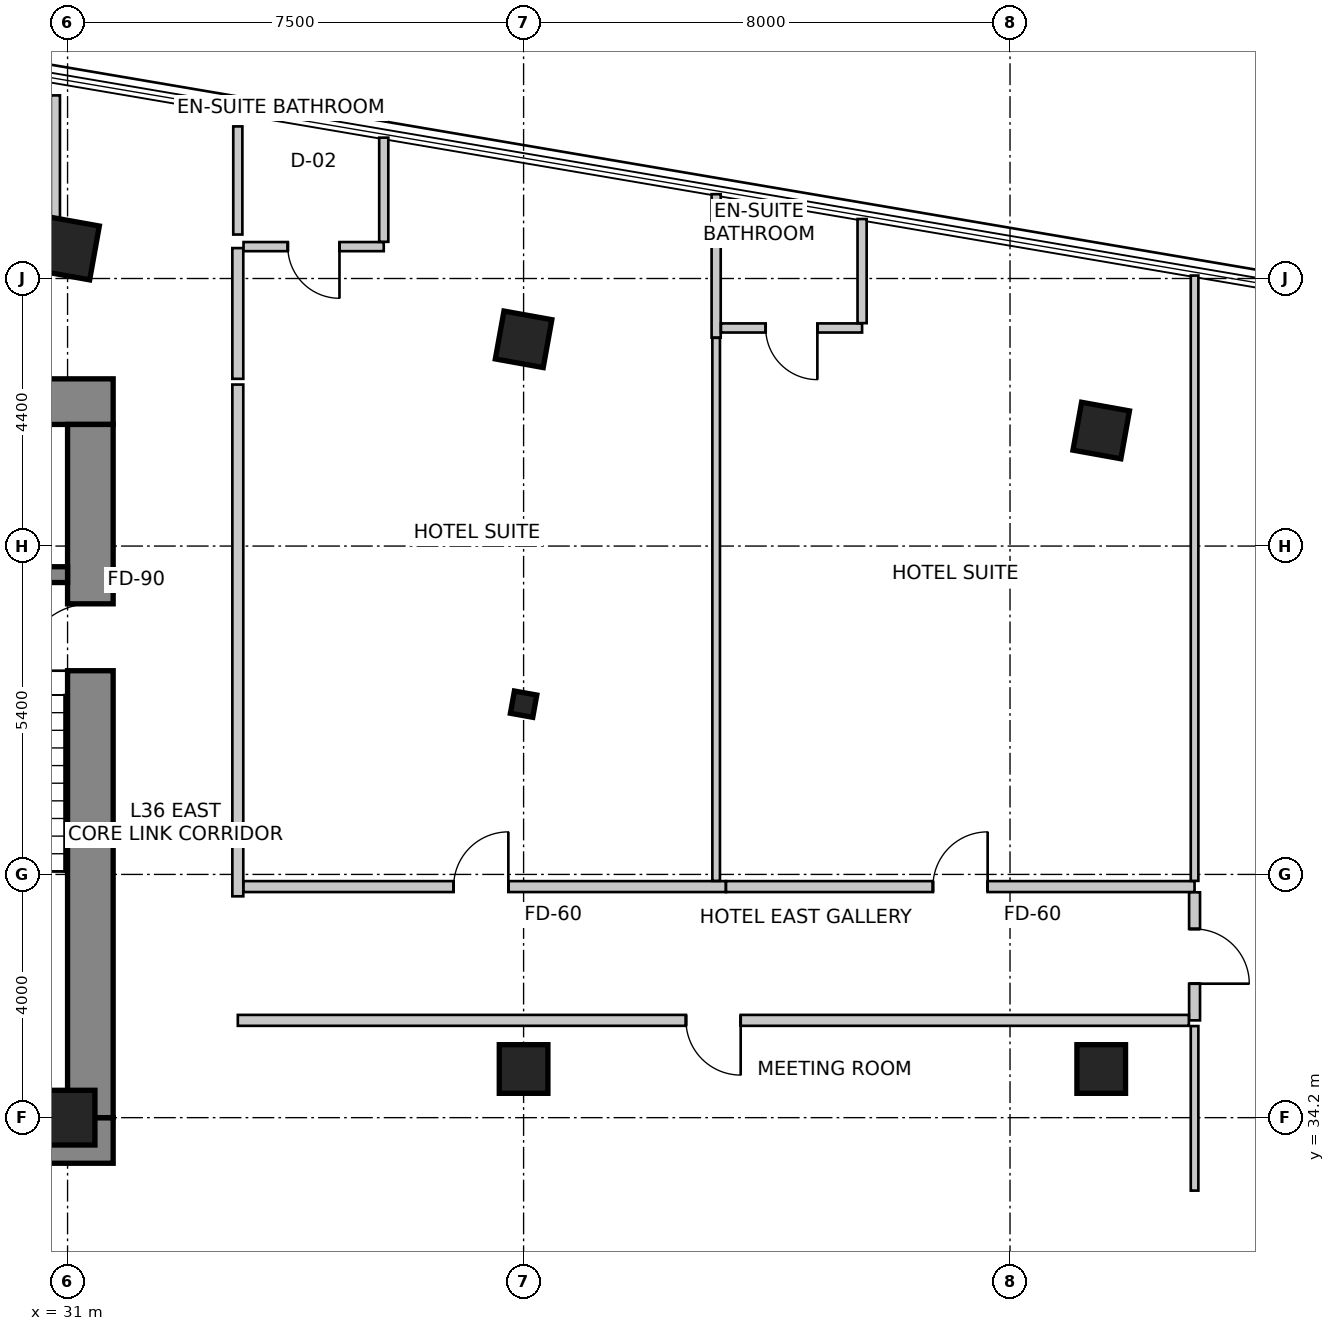
"""IFC4 building model, lengths in metres.
Left out: names, types, materials, properties, quantities, classifications, styles, units other than length and angle.
Written with IfcOpenShell. Run it as: python <this file> out.ifc"""

import sys

from ifc_helpers import new_model, si_unit, direction, frame, frame_2d, origin, origin_2d, place, context, subcontext, project, spatial, rectangle, i_section, extrude, source, transform, mapped, element, fill, save


model = new_model("IFC4")
c1 = context("Model", 3, precision=1e-05, world=origin(), true_north=direction((0.0, 1.0)))
c2 = subcontext(c1, "Body", "Model", "MODEL_VIEW")
j1 = project(units=[si_unit("LENGTHUNIT", "METRE"), si_unit("PLANEANGLEUNIT", "RADIAN")], contexts=[c1])
p1 = place(None, origin())
s1 = spatial("IfcSite", under=j1, at=p1, CompositionType="ELEMENT")
p2 = place(p1, origin())
s2 = spatial("IfcBuilding", under=s1, at=p2, CompositionType="ELEMENT")
p3 = place(p2, frame((0.0, 0.0, 146.6)))
s3 = spatial("IfcBuildingStorey", under=s2, at=p3, CompositionType="ELEMENT", Elevation=146.6)
p4 = place(p3, frame((15.85, 45.975, 0.0), z_axis=(0.0, 0.0, 1.0), x_axis=(1.0, 0.0, 0.0)))
e1 = element("IfcWall", 1, at=p4, inside=s3, PredefinedType="SHEAR", context=c2, shape_type="SweptSolid", body=[
    extrude(rectangle(XDim=15.9, YDim=0.75, at=frame_2d((7.95, 0.0))), origin(), (0.0, 0.0, 1.0), 3.6),
])
p5 = place(p3, frame((15.85, 33.825, 0.0), z_axis=(0.0, 0.0, 1.0), x_axis=(1.0, 0.0, 0.0)))
e2 = element("IfcWall", 2, at=p5, inside=s3, PredefinedType="SHEAR", context=c2, shape_type="SweptSolid", body=[
    extrude(rectangle(XDim=15.9, YDim=0.75, at=frame_2d((7.95, 0.0))), origin(), (0.0, 0.0, 1.0), 3.6),
])
m1 = source(origin(), c2, "Body", "SweptSolid", [
    extrude(rectangle(XDim=1.3, YDim=2.15, at=frame_2d((0.65, 1.075))), frame((0.0, 0.385, 0.0), z_axis=(0.0, -1.0, 0.0), x_axis=(1.0, 0.0, 0.0)), (0.0, 0.0, 1.0), 0.77),
])
p6 = place(p5, frame((10.08, 0.0, 0.0)))
e3 = element("IfcOpeningElement", 3, at=p6, cuts=e2, PredefinedType="OPENING", context=c2, shape_type="MappedRepresentation", body=[
    mapped(m1, transform((0.0, 0.0, 0.0), scale=1.0)),
])
p7 = place(p3, frame((31.375, 34.2, 0.0), z_axis=(0.0, 0.0, 1.0), x_axis=(0.0, 1.0, 0.0)))
e4 = element("IfcWall", 4, at=p7, inside=s3, PredefinedType="SHEAR", context=c2, shape_type="SweptSolid", body=[
    extrude(rectangle(XDim=11.4, YDim=0.75, at=frame_2d((5.7, 0.0))), origin(), (0.0, 0.0, 1.0), 3.6),
])
m2 = source(origin(), c2, "Body", "SweptSolid", [
    extrude(rectangle(XDim=1.1, YDim=2.15, at=frame_2d((0.55, 1.075))), frame((0.0, 0.385, 0.0), z_axis=(0.0, -1.0, 0.0), x_axis=(1.0, 0.0, 0.0)), (0.0, 0.0, 1.0), 0.77),
])
p8 = place(p7, frame((7.35, 0.0, 0.0)))
e5 = element("IfcOpeningElement", 5, at=p8, cuts=e4, PredefinedType="OPENING", context=c2, shape_type="MappedRepresentation", body=[
    mapped(m2, transform((0.0, 0.0, 0.0), scale=1.0)),
])
p9 = place(p3, frame((27.5, 43.13, 0.0), z_axis=(0.0, 0.0, 1.0), x_axis=(1.0, 0.0, 0.0)))
e6 = element("IfcWall", 6, at=p9, inside=s3, PredefinedType="SHEAR", context=c2, shape_type="SweptSolid", body=[
    extrude(rectangle(XDim=3.5, YDim=0.26, at=frame_2d((1.75, 0.0))), origin(), (0.0, 0.0, 1.0), 3.6),
])
m3 = source(origin(), c2, "Body", "SweptSolid", [
    extrude(rectangle(XDim=0.9, YDim=0.9, at=origin_2d()), origin(), (0.0, 0.0, 1.0), 3.6),
])
p10 = place(p3, frame((31.0, 48.5, 0.0), z_axis=(0.0, 0.0, 1.0), x_axis=(0.984195607969, -0.17708474032, 0.0)))
e7 = element("IfcColumn", 7, at=p10, inside=s3, PredefinedType="COLUMN", context=c2, shape_type="MappedRepresentation", body=[
    mapped(m3, transform((0.0, 0.0, 0.0), scale=1.0)),
])
m4 = source(origin(), c2, "Body", "SweptSolid", [
    extrude(rectangle(XDim=0.8, YDim=0.8, at=origin_2d()), origin(), (0.0, 0.0, 1.0), 3.6),
])
for number, where, z_axis, x_axis in (
    (8, (38.5, 47.0, 0.0), (0.0, 0.0, 1.0), (0.984, -0.177, 0.0)),
    (9, (48.0, 45.5, 0.0), (0.0, 0.0, 1.0), (0.984, -0.177, 0.0)),
):
    element("IfcColumn", number, at=place(p3, frame(where, z_axis=z_axis, x_axis=x_axis)), inside=s3, PredefinedType="COLUMN", context=c2, shape_type="MappedRepresentation", body=[
        mapped(m4, transform((0.0, 0.0, 0.0), scale=1.0)),
    ])
p11 = place(p3, frame((31.0, 34.2, 0.0), z_axis=(0.0, 0.0, 1.0), x_axis=(1.0, 0.0, 0.0)))
e10 = element("IfcColumn", 10, at=p11, inside=s3, PredefinedType="COLUMN", context=c2, shape_type="MappedRepresentation", body=[
    mapped(m3, transform((0.0, 0.0, 0.0), scale=1.0)),
])
for number, where, z_axis, x_axis in (
    (11, (38.5, 35.0, 0.0), (0.0, 0.0, 1.0), (1.0, 0.0, 0.0)),
    (12, (48.0, 35.0, 0.0), (0.0, 0.0, 1.0), (1.0, 0.0, 0.0)),
):
    element("IfcColumn", number, at=place(p3, frame(where, z_axis=z_axis, x_axis=x_axis)), inside=s3, PredefinedType="COLUMN", context=c2, shape_type="MappedRepresentation", body=[
        mapped(m4, transform((0.0, 0.0, 0.0), scale=1.0)),
    ])
m5 = source(origin(), c2, "Body", "SweptSolid", [
    extrude(i_section(OverallWidth=0.374, OverallDepth=0.372, WebThickness=0.016, FlangeThickness=0.026, FilletRadius=0.015, at=origin_2d()), origin(), (0.0, 0.0, 1.0), 3.6),
])
p12 = place(p3, frame((38.5, 41.0, 0.0), z_axis=(0.0, 0.0, 1.0), x_axis=(0.984195607969, -0.17708474032, 0.0)))
e13 = element("IfcColumn", 13, at=p12, inside=s3, PredefinedType="COLUMN", context=c2, shape_type="MappedRepresentation", body=[
    mapped(m5, transform((0.0, 0.0, 0.0), scale=1.0)),
])
p13 = place(p3, frame((23.962, 48.5, 0.0), z_axis=(0.0, 0.0, 1.0), x_axis=(1.0, 0.0, 0.0)))
e14 = element("IfcWall", 14, at=p13, inside=s3, PredefinedType="PARTITIONING", context=c2, shape_type="SweptSolid", body=[
    extrude(rectangle(XDim=6.998, YDim=0.18, at=frame_2d((3.499, 0.0))), origin(), (0.0, 0.0, 1.0), 2.492),
])
m6 = source(origin(), c2, "Body", "SweptSolid", [
    extrude(rectangle(XDim=0.85, YDim=2.15, at=frame_2d((0.425, 1.075))), frame((0.0, 0.1, 0.0), z_axis=(0.0, -1.0, 0.0), x_axis=(1.0, 0.0, 0.0)), (0.0, 0.0, 1.0), 0.2),
])
p14 = place(p13, frame((3.074, 0.0, 0.0)))
e15 = element("IfcOpeningElement", 15, at=p14, cuts=e14, PredefinedType="OPENING", context=c2, shape_type="MappedRepresentation", body=[
    mapped(m6, transform((0.0, 0.0, 0.0), scale=1.0)),
])
p15 = place(p3, frame((33.8, 48.5, 0.0), z_axis=(0.0, 0.0, 1.0), x_axis=(0.0, -1.0, 0.0)))
e16 = element("IfcWall", 16, at=p15, inside=s3, PredefinedType="PARTITIONING", context=c2, shape_type="SweptSolid", body=[
    extrude(rectangle(XDim=2.15, YDim=0.18, at=frame_2d((1.075, 0.0))), origin(), (0.0, 0.0, 1.0), 2.492),
])
p16 = place(p3, frame((33.8, 46.256, 0.0), z_axis=(0.0, 0.0, 1.0), x_axis=(0.0, -1.0, 0.0)))
e17 = element("IfcWall", 17, at=p16, inside=s3, PredefinedType="PARTITIONING", context=c2, shape_type="SweptSolid", body=[
    extrude(rectangle(XDim=8.416, YDim=0.18, at=frame_2d((4.208, 0.0))), origin(), (0.0, 0.0, 1.0), 2.788),
])
p17 = place(p3, frame((33.894, 38.0, 0.0), z_axis=(0.0, 0.0, 1.0), x_axis=(1.0, 0.0, 0.0)))
e18 = element("IfcWall", 18, at=p17, inside=s3, PredefinedType="PARTITIONING", context=c2, shape_type="SweptSolid", body=[
    extrude(rectangle(XDim=7.933, YDim=0.18, at=frame_2d((3.966, 0.0))), origin(), (0.0, 0.0, 1.0), 2.788),
])
m7 = source(origin(), c2, "Body", "SweptSolid", [
    extrude(rectangle(XDim=0.9, YDim=2.15, at=frame_2d((0.45, 1.075))), frame((0.0, 0.1, 0.0), z_axis=(0.0, -1.0, 0.0), x_axis=(1.0, 0.0, 0.0)), (0.0, 0.0, 1.0), 0.2),
])
p18 = place(p17, frame((3.455, 0.0, 0.0)))
e19 = element("IfcOpeningElement", 19, at=p18, cuts=e18, PredefinedType="OPENING", context=c2, shape_type="MappedRepresentation", body=[
    mapped(m7, transform((0.0, 0.0, 0.0), scale=1.0)),
])
p19 = place(p3, frame((41.829, 38.0, 0.0), z_axis=(0.0, 0.0, 1.0), x_axis=(1.0, 0.0, 0.0)))
e20 = element("IfcWall", 20, at=p19, inside=s3, PredefinedType="PARTITIONING", context=c2, shape_type="SweptSolid", body=[
    extrude(rectangle(XDim=7.706, YDim=0.18, at=frame_2d((3.853, 0.0))), origin(), (0.0, 0.0, 1.0), 2.788),
])
p20 = place(p19, frame((3.403, 0.0, 0.0)))
e21 = element("IfcOpeningElement", 21, at=p20, cuts=e20, PredefinedType="OPENING", context=c2, shape_type="MappedRepresentation", body=[
    mapped(m7, transform((0.0, 0.0, 0.0), scale=1.0)),
])
p21 = place(p3, frame((49.535, 37.906, 0.0), z_axis=(0.0, 0.0, 1.0), x_axis=(0.0, -1.0, 0.0)))
e22 = element("IfcWall", 22, at=p21, inside=s3, PredefinedType="PARTITIONING", context=c2, shape_type="SweptSolid", body=[
    extrude(rectangle(XDim=2.106, YDim=0.18, at=frame_2d((1.053, 0.0))), origin(), (0.0, 0.0, 1.0), 3.35),
])
p22 = place(p21, frame((0.603, 0.0, 0.0)))
e23 = element("IfcOpeningElement", 23, at=p22, cuts=e22, PredefinedType="OPENING", context=c2, shape_type="MappedRepresentation", body=[
    mapped(m7, transform((0.0, 0.0, 0.0), scale=1.0)),
])
p23 = place(p3, frame((49.441, 35.8, 0.0), z_axis=(0.0, 0.0, 1.0), x_axis=(-1.0, 0.0, 0.0)))
e24 = element("IfcWall", 24, at=p23, inside=s3, PredefinedType="PARTITIONING", context=c2, shape_type="SweptSolid", body=[
    extrude(rectangle(XDim=15.641, YDim=0.18, at=frame_2d((7.82, 0.0))), origin(), (0.0, 0.0, 1.0), 2.788),
])
p24 = place(p23, frame((7.371, 0.0, 0.0)))
e25 = element("IfcOpeningElement", 25, at=p24, cuts=e24, PredefinedType="OPENING", context=c2, shape_type="MappedRepresentation", body=[
    mapped(m7, transform((0.0, 0.0, 0.0), scale=1.0)),
])
p25 = place(p3, frame((36.2, 48.524, 0.0), z_axis=(0.0, 0.0, 1.0), x_axis=(-1.0, 0.0, 0.0)))
e26 = element("IfcWall", 26, at=p25, inside=s3, PredefinedType="PARTITIONING", context=c2, shape_type="SweptSolid", body=[
    extrude(rectangle(XDim=2.306, YDim=0.15, at=frame_2d((1.153, 0.0))), origin(), (0.0, 0.0, 1.0), 3.35),
])
m8 = source(origin(), c2, "Body", "SweptSolid", [
    extrude(rectangle(XDim=0.85, YDim=2.15, at=frame_2d((0.425, 1.075))), frame((0.0, 0.085, 0.0), z_axis=(0.0, -1.0, 0.0), x_axis=(1.0, 0.0, 0.0)), (0.0, 0.0, 1.0), 0.17),
])
p26 = place(p25, frame((0.728, 0.0, 0.0)))
e27 = element("IfcOpeningElement", 27, at=p26, cuts=e26, PredefinedType="OPENING", context=c2, shape_type="MappedRepresentation", body=[
    mapped(m8, transform((0.0, 0.0, 0.0), scale=1.0)),
])
p27 = place(p3, frame((36.2, 50.316, 0.0), z_axis=(0.0, 0.0, 1.0), x_axis=(0.0, -1.0, 0.0)))
e28 = element("IfcWall", 28, at=p27, inside=s3, PredefinedType="PARTITIONING", context=c2, shape_type="SweptSolid", body=[
    extrude(rectangle(XDim=1.713, YDim=0.15, at=frame_2d((0.856, 0.0))), origin(), (0.0, 0.0, 1.0), 3.35),
])
p28 = place(p3, frame((41.667, 49.387, 0.0), z_axis=(0.0, 0.0, 1.0), x_axis=(0.0, -1.0, 0.0)))
e29 = element("IfcWall", 29, at=p28, inside=s3, PredefinedType="PARTITIONING", context=c2, shape_type="SweptSolid", body=[
    extrude(rectangle(XDim=2.36, YDim=0.15, at=frame_2d((1.18, 0.0))), origin(), (0.0, 0.0, 1.0), 3.35),
])
p29 = place(p3, frame((41.667, 47.025, 0.0), z_axis=(0.0, 0.0, 1.0), x_axis=(0.0, -1.0, 0.0)))
e30 = element("IfcWall", 30, at=p29, inside=s3, PredefinedType="PARTITIONING", context=c2, shape_type="SweptSolid", body=[
    extrude(rectangle(XDim=8.931, YDim=0.125, at=frame_2d((4.465, 0.0))), origin(), (0.0, 0.0, 1.0), 2.492),
])
p30 = place(p3, frame((44.067, 47.187, 0.0), z_axis=(0.0, 0.0, 1.0), x_axis=(-1.0, 0.0, 0.0)))
e31 = element("IfcWall", 31, at=p30, inside=s3, PredefinedType="PARTITIONING", context=c2, shape_type="SweptSolid", body=[
    extrude(rectangle(XDim=2.321, YDim=0.15, at=frame_2d((1.16, 0.0))), origin(), (0.0, 0.0, 1.0), 3.35),
])
p31 = place(p30, frame((0.736, 0.0, 0.0)))
e32 = element("IfcOpeningElement", 32, at=p31, cuts=e31, PredefinedType="OPENING", context=c2, shape_type="MappedRepresentation", body=[
    mapped(m8, transform((0.0, 0.0, 0.0), scale=1.0)),
])
p32 = place(p3, frame((44.067, 48.979, 0.0), z_axis=(0.0, 0.0, 1.0), x_axis=(0.0, -1.0, 0.0)))
e33 = element("IfcWall", 33, at=p32, inside=s3, PredefinedType="PARTITIONING", context=c2, shape_type="SweptSolid", body=[
    extrude(rectangle(XDim=1.713, YDim=0.15, at=frame_2d((0.856, 0.0))), origin(), (0.0, 0.0, 1.0), 3.35),
])
p33 = place(p3, frame((49.535, 48.049, 0.0), z_axis=(0.0, 0.0, 1.0), x_axis=(0.0, -1.0, 0.0)))
e34 = element("IfcWall", 34, at=p33, inside=s3, PredefinedType="PARTITIONING", context=c2, shape_type="SweptSolid", body=[
    extrude(rectangle(XDim=9.955, YDim=0.125, at=frame_2d((4.977, 0.0))), origin(), (0.0, 0.0, 1.0), 3.35),
])
p34 = place(p3, frame((49.535, 33.0, 0.0), z_axis=(0.0, 0.0, 1.0), x_axis=(0.0, 1.0, 0.0)))
e35 = element("IfcWall", 35, at=p34, inside=s3, PredefinedType="PARTITIONING", context=c2, shape_type="SweptSolid", body=[
    extrude(rectangle(XDim=2.706, YDim=0.125, at=frame_2d((1.353, 0.0))), origin(), (0.0, 0.0, 1.0), 3.35),
])
p35 = place(p3, frame((30.8, 51.011, 0.0), z_axis=(0.0, 0.0, 1.0), x_axis=(0.0, -1.0, 0.0)))
e36 = element("IfcWall", 36, at=p35, inside=s3, PredefinedType="PARTITIONING", context=c2, shape_type="SweptSolid", body=[
    extrude(rectangle(XDim=2.292, YDim=0.15, at=frame_2d((1.146, 0.0))), origin(), (0.0, 0.0, 1.0), 3.35),
])
p36 = place(p3, frame((33.8, 48.723, 0.0), z_axis=(0.0, 0.0, 1.0), x_axis=(0.0, 1.0, 0.0)))
e37 = element("IfcWall", 37, at=p36, inside=s3, PredefinedType="PARTITIONING", context=c2, shape_type="SweptSolid", body=[
    extrude(rectangle(XDim=1.778, YDim=0.15, at=frame_2d((0.889, 0.0))), origin(), (0.0, 0.0, 1.0), 3.35),
])
m9 = source(origin(), c2, "Body", "SweptSolid", [
    extrude(rectangle(XDim=1.1, YDim=2.15, at=frame_2d((0.55, 1.075))), frame((0.0, 0.025, 0.0), z_axis=(0.0, -1.0, 0.0), x_axis=(1.0, 0.0, 0.0)), (0.0, 0.0, 1.0), 0.05),
])
p37 = place(p8, origin())
e38 = element("IfcDoor", 38, at=p37, inside=s3, OperationType="SINGLE_SWING_LEFT", PredefinedType="DOOR", context=c2, shape_type="MappedRepresentation", body=[
    mapped(m9, transform((0.0, 0.0, 0.0), scale=1.0)),
])
fill(e5, e38)
m10 = source(origin(), c2, "Body", "SweptSolid", [
    extrude(rectangle(XDim=0.85, YDim=2.15, at=frame_2d((0.425, 1.075))), frame((0.0, 0.025, 0.0), z_axis=(0.0, -1.0, 0.0), x_axis=(1.0, 0.0, 0.0)), (0.0, 0.0, 1.0), 0.05),
])
p38 = place(p26, origin())
e39 = element("IfcDoor", 39, at=p38, inside=s3, OperationType="SINGLE_SWING_LEFT", PredefinedType="DOOR", context=c2, shape_type="MappedRepresentation", body=[
    mapped(m10, transform((0.0, 0.0, 0.0), scale=1.0)),
])
fill(e27, e39)
m11 = source(origin(), c2, "Body", "SweptSolid", [
    extrude(rectangle(XDim=0.9, YDim=2.15, at=frame_2d((0.45, 1.075))), frame((0.0, 0.025, 0.0), z_axis=(0.0, -1.0, 0.0), x_axis=(1.0, 0.0, 0.0)), (0.0, 0.0, 1.0), 0.05),
])
p39 = place(p18, origin())
e40 = element("IfcDoor", 40, at=p39, inside=s3, OperationType="SINGLE_SWING_RIGHT", PredefinedType="DOOR", context=c2, shape_type="MappedRepresentation", body=[
    mapped(m11, transform((0.0, 0.0, 0.0), scale=1.0)),
])
fill(e19, e40)
p40 = place(p31, origin())
e41 = element("IfcDoor", 41, at=p40, inside=s3, OperationType="SINGLE_SWING_LEFT", PredefinedType="DOOR", context=c2, shape_type="MappedRepresentation", body=[
    mapped(m10, transform((0.0, 0.0, 0.0), scale=1.0)),
])
fill(e32, e41)
p41 = place(p20, origin())
e42 = element("IfcDoor", 42, at=p41, inside=s3, OperationType="SINGLE_SWING_RIGHT", PredefinedType="DOOR", context=c2, shape_type="MappedRepresentation", body=[
    mapped(m11, transform((0.0, 0.0, 0.0), scale=1.0)),
])
fill(e21, e42)
p42 = place(p22, origin())
e43 = element("IfcDoor", 43, at=p42, inside=s3, OperationType="SINGLE_SWING_RIGHT", PredefinedType="DOOR", context=c2, shape_type="MappedRepresentation", body=[
    mapped(m11, transform((0.0, 0.0, 0.0), scale=1.0)),
])
fill(e23, e43)
m12 = source(origin(), c2, "Body", "SweptSolid", [
    extrude(rectangle(XDim=0.9, YDim=2.15, at=frame_2d((0.45, 1.075))), frame((0.0, 0.025, 0.0), z_axis=(0.0, -1.0, 0.0), x_axis=(1.0, 0.0, 0.0)), (0.0, 0.0, 1.0), 0.05),
])
p43 = place(p24, origin())
e44 = element("IfcDoor", 44, at=p43, inside=s3, OperationType="SINGLE_SWING_LEFT", PredefinedType="DOOR", context=c2, shape_type="MappedRepresentation", body=[
    mapped(m12, transform((0.0, 0.0, 0.0), scale=1.0)),
])
fill(e25, e44)
save(model, sys.argv[1])
